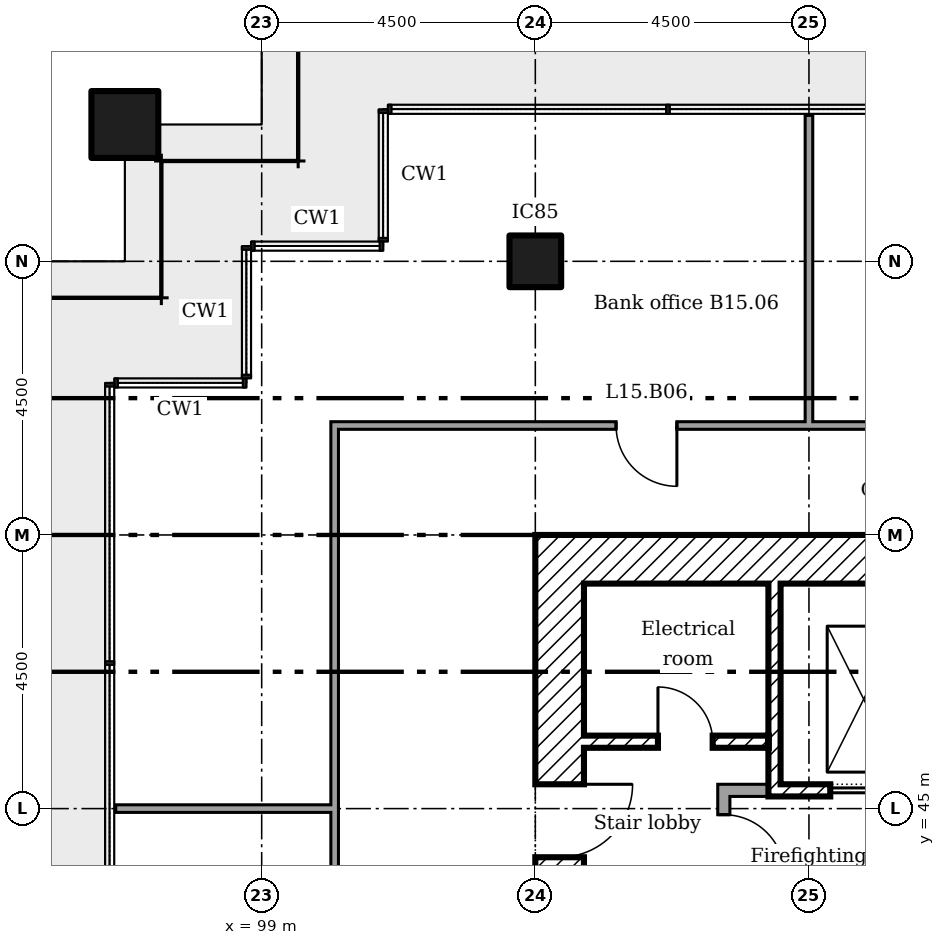
"""IFC4 building model, lengths in metres.
Left out: names, types, materials, properties, quantities, classifications, styles, units other than length and angle.
Written with IfcOpenShell. Run it as: python <this file> out.ifc"""

import sys

from ifc_helpers import new_model, si_unit, direction, frame, frame_2d, origin, origin_2d, place, context, subcontext, project, spatial, rectangle, extrude, element, fill, save


model = new_model("IFC4")
c1 = context("Model", 3, precision=1e-05, world=origin(), true_north=direction((0.0, 1.0)))
c2 = subcontext(c1, "Body", "Model", "MODEL_VIEW")
j1 = project(units=[si_unit("LENGTHUNIT", "METRE"), si_unit("PLANEANGLEUNIT", "RADIAN")], contexts=[c1])
p1 = place(None, origin())
s1 = spatial("IfcSite", under=j1, at=p1, CompositionType="ELEMENT")
p2 = place(p1, origin())
s2 = spatial("IfcBuilding", under=s1, at=p2, CompositionType="ELEMENT")
p3 = place(p2, frame((0.0, 0.0, 65.4)))
s3 = spatial("IfcBuildingStorey", under=s2, at=p3, CompositionType="ELEMENT", Elevation=65.4)
p4 = place(p3, frame((96.75, 56.25, 0.0)))
e1 = element("IfcColumn", 1, at=p4, inside=s3, PredefinedType="COLUMN", context=c2, shape_type="SweptSolid", body=[
    extrude(rectangle(XDim=1.1, YDim=1.1, at=origin_2d()), origin(), (0.0, 0.0, 1.0), 3.6),
])
p5 = place(p3, frame((103.5, 54.0, 0.0)))
e2 = element("IfcColumn", 2, at=p5, inside=s3, PredefinedType="COLUMN", context=c2, shape_type="SweptSolid", body=[
    extrude(rectangle(XDim=0.85, YDim=0.85, at=origin_2d()), origin(), (0.0, 0.0, 1.0), 3.6),
])
p6 = place(p3, frame((104.3, 49.1, 0.0)))
e3 = element("IfcWall", 3, at=p6, inside=s3, PredefinedType="SHEAR", context=c2, shape_type="SweptSolid", body=[
    extrude(rectangle(XDim=11.9, YDim=0.8, at=frame_2d((5.95, 0.0))), origin(), (0.0, 0.0, 1.0), 3.35),
])
p7 = place(p3, frame((103.9, 36.0, 0.0), z_axis=(0.0, 0.0, 1.0), x_axis=(0.0, 1.0, 0.0)))
e4 = element("IfcWall", 4, at=p7, inside=s3, PredefinedType="SHEAR", context=c2, shape_type="SweptSolid", body=[
    extrude(rectangle(XDim=13.5, YDim=0.8, at=frame_2d((6.75, 0.0))), origin(), (0.0, 0.0, 1.0), 3.35),
])
p8 = place(p7, frame((8.2, 0.0, 0.0)))
e5 = element("IfcOpeningElement", 5, at=p8, cuts=e4, PredefinedType="OPENING", context=c2, shape_type="SweptSolid", body=[
    extrude(rectangle(XDim=1.2, YDim=2.1, at=frame_2d((0.6, 1.05))), frame((0.0, 0.41, 0.0), z_axis=(0.0, -1.0, 0.0), x_axis=(1.0, 0.0, 0.0)), (0.0, 0.0, 1.0), 0.82),
])
p9 = place(p7, frame((6.225, 0.0, 0.0)))
e6 = element("IfcOpeningElement", 6, at=p9, cuts=e4, PredefinedType="OPENING", context=c2, shape_type="SweptSolid", body=[
    extrude(rectangle(XDim=1.0, YDim=2.1, at=frame_2d((0.5, 1.05))), frame((0.0, 0.41, 0.0), z_axis=(0.0, -1.0, 0.0), x_axis=(1.0, 0.0, 0.0)), (0.0, 0.0, 1.0), 0.82),
])
p10 = place(p3, frame((107.433, 48.7, 0.0), z_axis=(0.0, 0.0, 1.0), x_axis=(0.0, -1.0, 0.0)))
e7 = element("IfcWall", 7, at=p10, inside=s3, PredefinedType="SHEAR", context=c2, shape_type="SweptSolid", body=[
    extrude(rectangle(XDim=3.5, YDim=0.2, at=frame_2d((1.75, 0.0))), origin(), (0.0, 0.0, 1.0), 3.35),
])
p11 = place(p3, frame((106.5, 45.3, 0.0)))
e8 = element("IfcWall", 8, at=p11, inside=s3, PredefinedType="PARTITIONING", context=c2, shape_type="SweptSolid", body=[
    extrude(rectangle(XDim=0.833, YDim=0.2, at=frame_2d((0.417, 0.0))), origin(), (0.0, 0.0, 1.0), 3.35),
])
p12 = place(p3, frame((106.6, 43.7, 0.0), z_axis=(0.0, 0.0, 1.0), x_axis=(0.0, 1.0, 0.0)))
e9 = element("IfcWall", 9, at=p12, inside=s3, PredefinedType="PARTITIONING", context=c2, shape_type="SweptSolid", body=[
    extrude(rectangle(XDim=1.5, YDim=0.2, at=frame_2d((0.75, 0.0))), origin(), (0.0, 0.0, 1.0), 3.35),
])
p13 = place(p12, frame((0.2, 0.0, 0.0)))
e10 = element("IfcOpeningElement", 10, at=p13, cuts=e9, PredefinedType="OPENING", context=c2, shape_type="SweptSolid", body=[
    extrude(rectangle(XDim=1.0, YDim=2.1, at=frame_2d((0.5, 1.05))), frame((0.0, 0.11, 0.0), z_axis=(0.0, -1.0, 0.0), x_axis=(1.0, 0.0, 0.0)), (0.0, 0.0, 1.0), 0.22),
])
p14 = place(p3, frame((104.3, 46.1, 0.0)))
e11 = element("IfcWall", 11, at=p14, inside=s3, PredefinedType="SHEAR", context=c2, shape_type="SweptSolid", body=[
    extrude(rectangle(XDim=3.033, YDim=0.2, at=frame_2d((1.517, 0.0))), origin(), (0.0, 0.0, 1.0), 3.35),
])
p15 = place(p14, frame((1.217, 0.0, 0.0)))
e12 = element("IfcOpeningElement", 12, at=p15, cuts=e11, PredefinedType="OPENING", context=c2, shape_type="SweptSolid", body=[
    extrude(rectangle(XDim=0.9, YDim=2.1, at=frame_2d((0.45, 1.05))), frame((0.0, 0.11, 0.0), z_axis=(0.0, -1.0, 0.0), x_axis=(1.0, 0.0, 0.0)), (0.0, 0.0, 1.0), 0.22),
])
p16 = place(p3, frame((107.533, 45.3, 0.0)))
e13 = element("IfcWall", 13, at=p16, inside=s3, PredefinedType="SHEAR", context=c2, shape_type="SweptSolid", body=[
    extrude(rectangle(XDim=2.733, YDim=0.2, at=frame_2d((1.367, 0.0))), origin(), (0.0, 0.0, 1.0), 3.35),
])
p17 = place(p16, frame((0.817, 0.0, 0.0)))
e14 = element("IfcOpeningElement", 14, at=p17, cuts=e13, PredefinedType="OPENING", context=c2, shape_type="SweptSolid", body=[
    extrude(rectangle(XDim=1.1, YDim=2.1, at=frame_2d((0.55, 1.05))), frame((0.0, 0.11, 0.0), z_axis=(0.0, -1.0, 0.0), x_axis=(1.0, 0.0, 0.0)), (0.0, 0.0, 1.0), 0.22),
])
p18 = place(p3, frame((96.6, 45.0, 0.0)))
e15 = element("IfcWall", 15, at=p18, inside=s3, PredefinedType="PARTITIONING", context=c2, shape_type="SweptSolid", body=[
    extrude(rectangle(XDim=3.6, YDim=0.125, at=frame_2d((1.8, 0.0))), origin(), (0.0, 0.0, 1.0), 2.851),
])
p19 = place(p3, frame((100.137, 51.3, 0.0)))
e16 = element("IfcWall", 16, at=p19, inside=s3, PredefinedType="PARTITIONING", context=c2, shape_type="SweptSolid", body=[
    extrude(rectangle(XDim=19.325, YDim=0.125, at=frame_2d((9.663, 0.0))), origin(), (0.0, 0.0, 1.0), 3.45),
])
p20 = place(p19, frame((10.619, 0.0, 0.0)))
e17 = element("IfcOpeningElement", 17, at=p20, cuts=e16, PredefinedType="OPENING", context=c2, shape_type="SweptSolid", body=[
    extrude(rectangle(XDim=1.0, YDim=2.1, at=frame_2d((0.5, 1.05))), frame((0.0, 0.073, 0.0), z_axis=(0.0, -1.0, 0.0), x_axis=(1.0, 0.0, 0.0)), (0.0, 0.0, 1.0), 0.145),
])
p21 = place(p19, frame((4.69, 0.0, 0.0)))
e18 = element("IfcOpeningElement", 18, at=p21, cuts=e16, PredefinedType="OPENING", context=c2, shape_type="SweptSolid", body=[
    extrude(rectangle(XDim=1.0, YDim=2.1, at=frame_2d((0.5, 1.05))), frame((0.0, 0.073, 0.0), z_axis=(0.0, -1.0, 0.0), x_axis=(1.0, 0.0, 0.0)), (0.0, 0.0, 1.0), 0.145),
])
p22 = place(p3, frame((100.2, 33.363, 0.0), z_axis=(0.0, 0.0, 1.0), x_axis=(0.0, 1.0, 0.0)))
e19 = element("IfcWall", 19, at=p22, inside=s3, PredefinedType="PARTITIONING", context=c2, shape_type="SweptSolid", body=[
    extrude(rectangle(XDim=17.875, YDim=0.125, at=frame_2d((8.938, 0.0))), origin(), (0.0, 0.0, 1.0), 3.45),
])
p23 = place(p22, frame((5.288, 0.0, 0.0)))
e20 = element("IfcOpeningElement", 20, at=p23, cuts=e19, PredefinedType="OPENING", context=c2, shape_type="SweptSolid", body=[
    extrude(rectangle(XDim=1.0, YDim=2.1, at=frame_2d((0.5, 1.05))), frame((0.0, 0.073, 0.0), z_axis=(0.0, -1.0, 0.0), x_axis=(1.0, 0.0, 0.0)), (0.0, 0.0, 1.0), 0.145),
])
p24 = place(p3, frame((108.0, 51.3, 0.0), z_axis=(0.0, 0.0, 1.0), x_axis=(0.0, 1.0, 0.0)))
e21 = element("IfcWall", 21, at=p24, inside=s3, PredefinedType="PARTITIONING", context=c2, shape_type="SweptSolid", body=[
    extrude(rectangle(XDim=5.1, YDim=0.125, at=frame_2d((2.55, 0.0))), origin(), (0.0, 0.0, 1.0), 2.851),
])
p25 = place(p8, frame((1.2, 0.0, 0.0), x_axis=(-1.0, 0.0, 0.0)))
e22 = element("IfcDoor", 22, at=p25, inside=s3, OperationType="SINGLE_SWING_RIGHT", PredefinedType="DOOR", context=c2, shape_type="SweptSolid", body=[
    extrude(rectangle(XDim=1.2, YDim=2.1, at=frame_2d((0.6, 1.05))), frame((0.0, 0.025, 0.0), z_axis=(0.0, -1.0, 0.0), x_axis=(1.0, 0.0, 0.0)), (0.0, 0.0, 1.0), 0.05),
])
fill(e5, e22)
p26 = place(p13, frame((1.0, 0.0, 0.0), x_axis=(-1.0, 0.0, 0.0)))
e23 = element("IfcDoor", 23, at=p26, inside=s3, OperationType="SINGLE_SWING_LEFT", PredefinedType="DOOR", context=c2, shape_type="SweptSolid", body=[
    extrude(rectangle(XDim=1.0, YDim=2.1, at=frame_2d((0.5, 1.05))), frame((0.0, 0.025, 0.0), z_axis=(0.0, -1.0, 0.0), x_axis=(1.0, 0.0, 0.0)), (0.0, 0.0, 1.0), 0.05),
])
fill(e10, e23)
p27 = place(p15, origin())
e24 = element("IfcDoor", 24, at=p27, inside=s3, OperationType="SINGLE_SWING_RIGHT", PredefinedType="DOOR", context=c2, shape_type="SweptSolid", body=[
    extrude(rectangle(XDim=0.9, YDim=2.1, at=frame_2d((0.45, 1.05))), frame((0.0, 0.025, 0.0), z_axis=(0.0, -1.0, 0.0), x_axis=(1.0, 0.0, 0.0)), (0.0, 0.0, 1.0), 0.05),
])
fill(e12, e24)
p28 = place(p17, origin())
e25 = element("IfcDoor", 25, at=p28, inside=s3, OperationType="SLIDING_TO_LEFT", PredefinedType="DOOR", context=c2, shape_type="SweptSolid", body=[
    extrude(rectangle(XDim=1.1, YDim=2.1, at=frame_2d((0.55, 1.05))), frame((0.0, 0.025, 0.0), z_axis=(0.0, -1.0, 0.0), x_axis=(1.0, 0.0, 0.0)), (0.0, 0.0, 1.0), 0.05),
])
fill(e14, e25)
p29 = place(p21, frame((1.0, 0.0, 0.0), x_axis=(-1.0, 0.0, 0.0)))
e26 = element("IfcDoor", 26, at=p29, inside=s3, OperationType="SINGLE_SWING_RIGHT", PredefinedType="DOOR", context=c2, shape_type="SweptSolid", body=[
    extrude(rectangle(XDim=1.0, YDim=2.1, at=frame_2d((0.5, 1.05))), frame((0.0, 0.025, 0.0), z_axis=(0.0, -1.0, 0.0), x_axis=(1.0, 0.0, 0.0)), (0.0, 0.0, 1.0), 0.05),
])
fill(e18, e26)
save(model, sys.argv[1])
